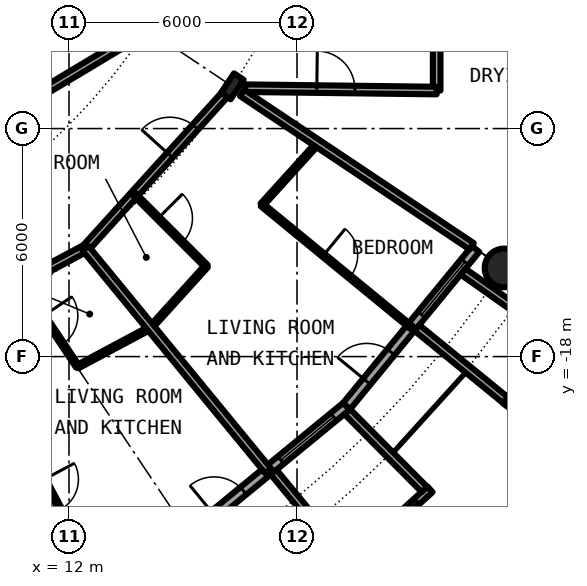
"""IFC4 building model, lengths in metres.
Left out: names, types, materials, properties, quantities, classifications, styles, units other than length and angle.
Written with IfcOpenShell. Run it as: python <this file> out.ifc"""

import sys

from ifc_helpers import new_model, si_unit, direction, frame, frame_2d, origin, origin_2d, place, context, subcontext, project, spatial, rectangle, circle, hollow_circle, i_section, extrude, element, fill, save


model = new_model("IFC4")
c1 = context("Model", 3, precision=1e-05, world=origin(), true_north=direction((0.0, 1.0)))
c2 = subcontext(c1, "Body", "Model", "MODEL_VIEW")
j1 = project(units=[si_unit("LENGTHUNIT", "METRE"), si_unit("PLANEANGLEUNIT", "RADIAN")], contexts=[c1])
p1 = place(None, origin())
s1 = spatial("IfcSite", under=j1, at=p1, CompositionType="ELEMENT")
p2 = place(p1, origin())
s2 = spatial("IfcBuilding", under=s1, at=p2, CompositionType="ELEMENT")
p3 = place(p2, frame((0.0, 0.0, 50.25)))
s3 = spatial("IfcBuildingStorey", under=s2, at=p3, CompositionType="ELEMENT", Elevation=50.25)
p4 = place(p3, frame((23.448, -15.667, 0.0), z_axis=(0.0, 0.0, 1.0), x_axis=(1.0, 0.0, 0.0)))
e1 = element("IfcColumn", 1, at=p4, inside=s3, PredefinedType="COLUMN", context=c2, shape_type="SweptSolid", body=[
    extrude(hollow_circle(Radius=0.508, WallThickness=0.05, at=origin_2d()), origin(), (0.0, 0.0, 1.0), 3.05),
])
p5 = place(p3, frame((16.297, -10.889, 0.0), z_axis=(0.0, 0.0, 1.0), x_axis=(0.831469612303, -0.55557023302, 0.0)))
e2 = element("IfcColumn", 2, at=p5, inside=s3, PredefinedType="COLUMN", context=c2, shape_type="SweptSolid", body=[
    extrude(i_section(OverallWidth=0.305, OverallDepth=0.62, WebThickness=0.021, FlangeThickness=0.04, FilletRadius=0.027, at=origin_2d()), origin(), (0.0, 0.0, 1.0), 3.05),
])
p6 = place(p3, frame((15.167, -22.699, 0.0), z_axis=(0.0, 0.0, 1.0), x_axis=(0.773019449054, 0.634382322723, 0.0)))
e3 = element("IfcWall", 3, at=p6, inside=s3, PredefinedType="SOLIDWALL", context=c2, shape_type="SweptSolid", body=[
    extrude(rectangle(XDim=5.352, YDim=0.25, at=frame_2d((2.676, 0.0))), origin(), (0.0, 0.0, 1.0), 2.7),
])
p7 = place(p6, frame((0.841, 0.0, 0.0)))
e4 = element("IfcOpeningElement", 4, at=p7, cuts=e3, PredefinedType="OPENING", context=c2, shape_type="SweptSolid", body=[
    extrude(rectangle(XDim=1.0, YDim=2.2, at=frame_2d((0.5, 1.1))), frame((0.0, 0.135, 0.0), z_axis=(0.0, -1.0, 0.0), x_axis=(1.0, 0.0, 0.0)), (0.0, 0.0, 1.0), 0.27),
])
p8 = place(p6, frame((3.111, 0.0, 0.3)))
e5 = element("IfcOpeningElement", 5, at=p8, cuts=e3, PredefinedType="OPENING", context=c2, shape_type="SweptSolid", body=[
    extrude(rectangle(XDim=1.8, YDim=2.1, at=frame_2d((0.9, 1.05))), frame((0.0, 0.135, 0.0), z_axis=(0.0, -1.0, 0.0), x_axis=(1.0, 0.0, 0.0)), (0.0, 0.0, 1.0), 0.27),
])
p9 = place(p3, frame((19.282, -23.503, -0.03), z_axis=(0.0, 0.0, 1.0), x_axis=(0.740998365753, 0.671506829416, 0.0)))
e6 = element("IfcWall", 6, at=p9, inside=s3, PredefinedType="SOLIDWALL", context=c2, shape_type="SweptSolid", body=[
    extrude(rectangle(XDim=2.993, YDim=0.2, at=frame_2d((1.497, 0.0))), origin(), (0.0, 0.0, 1.0), 2.73),
])
p10 = place(p9, frame((0.457, 0.0, 0.33)))
e7 = element("IfcOpeningElement", 7, at=p10, cuts=e6, PredefinedType="OPENING", context=c2, shape_type="SweptSolid", body=[
    extrude(circle(Radius=1.04, at=frame_2d((1.04, 1.04))), frame((0.0, 0.11, 0.0), z_axis=(0.0, -1.0, 0.0), x_axis=(1.0, 0.0, 0.0)), (0.0, 0.0, 1.0), 0.22),
])
p11 = place(p3, frame((17.384, -21.041, -0.03), z_axis=(0.0, 0.0, 1.0), x_axis=(0.63709551667, -0.770784861449, 0.0)))
e8 = element("IfcWall", 8, at=p11, inside=s3, PredefinedType="SOLIDWALL", context=c2, shape_type="SweptSolid", body=[
    extrude(rectangle(XDim=3.006, YDim=0.2, at=frame_2d((1.503, 0.0))), origin(), (0.0, 0.0, 1.0), 2.73),
])
p12 = place(p3, frame((19.323, -19.45, -0.03), z_axis=(0.0, 0.0, 1.0), x_axis=(0.704476739375, -0.709727076896, 0.0)))
e9 = element("IfcWall", 9, at=p12, inside=s3, PredefinedType="SOLIDWALL", context=c2, shape_type="SweptSolid", body=[
    extrude(rectangle(XDim=2.883, YDim=0.2, at=frame_2d((1.441, 0.0))), origin(), (0.0, 0.0, 1.0), 2.73),
])
p13 = place(p3, frame((19.304, -19.304, 0.0), z_axis=(0.0, 0.0, 1.0), x_axis=(0.634382322723, 0.773019449054, 0.0)))
e10 = element("IfcWall", 10, at=p13, inside=s3, PredefinedType="SOLIDWALL", context=c2, shape_type="SweptSolid", body=[
    extrude(rectangle(XDim=5.352, YDim=0.25, at=frame_2d((2.676, 0.0))), origin(), (0.0, 0.0, 1.0), 2.7),
])
p14 = place(p13, frame((0.841, 0.0, 0.0)))
e11 = element("IfcOpeningElement", 11, at=p14, cuts=e10, PredefinedType="OPENING", context=c2, shape_type="SweptSolid", body=[
    extrude(rectangle(XDim=1.0, YDim=2.2, at=frame_2d((0.5, 1.1))), frame((0.0, 0.135, 0.0), z_axis=(0.0, -1.0, 0.0), x_axis=(1.0, 0.0, 0.0)), (0.0, 0.0, 1.0), 0.27),
])
p15 = place(p13, frame((3.111, 0.0, 0.3)))
e12 = element("IfcOpeningElement", 12, at=p15, cuts=e10, PredefinedType="OPENING", context=c2, shape_type="SweptSolid", body=[
    extrude(rectangle(XDim=1.8, YDim=2.1, at=frame_2d((0.9, 1.05))), frame((0.0, 0.135, 0.0), z_axis=(0.0, -1.0, 0.0), x_axis=(1.0, 0.0, 0.0)), (0.0, 0.0, 1.0), 0.27),
])
p16 = place(p3, frame((23.497, -19.289, -0.03), z_axis=(0.0, 0.0, 1.0), x_axis=(0.60418752353, 0.796842165306, 0.0)))
e13 = element("IfcWall", 13, at=p16, inside=s3, PredefinedType="SOLIDWALL", context=c2, shape_type="SweptSolid", body=[
    extrude(rectangle(XDim=2.337, YDim=0.2, at=frame_2d((1.168, 0.0))), origin(), (0.0, 0.0, 1.0), 2.73),
])
p17 = place(p16, frame((0.128, 0.0, 0.33)))
e14 = element("IfcOpeningElement", 14, at=p17, cuts=e13, PredefinedType="OPENING", context=c2, shape_type="SweptSolid", body=[
    extrude(circle(Radius=1.04, at=frame_2d((1.04, 1.04))), frame((0.0, 0.11, 0.0), z_axis=(0.0, -1.0, 0.0), x_axis=(1.0, 0.0, 0.0)), (0.0, 0.0, 1.0), 0.22),
])
p18 = place(p3, frame((21.155, -17.246, -0.03), z_axis=(0.0, 0.0, 1.0), x_axis=(0.775179004516, -0.631741648902, 0.0)))
e15 = element("IfcWall", 15, at=p18, inside=s3, PredefinedType="SOLIDWALL", context=c2, shape_type="SweptSolid", body=[
    extrude(rectangle(XDim=3.006, YDim=0.2, at=frame_2d((1.503, 0.0))), origin(), (0.0, 0.0, 1.0), 2.73),
])
p19 = place(p3, frame((22.37, -15.765, -0.03), z_axis=(0.0, 0.0, 1.0), x_axis=(0.817256123454, -0.576274612209, 0.0)))
e16 = element("IfcWall", 16, at=p19, inside=s3, PredefinedType="SOLIDWALL", context=c2, shape_type="SweptSolid", body=[
    extrude(rectangle(XDim=2.933, YDim=0.2, at=frame_2d((1.466, 0.0))), origin(), (0.0, 0.0, 1.0), 2.73),
])
p20 = place(p3, frame((14.153, -17.234, 0.0), z_axis=(0.0, 0.0, 1.0), x_axis=(0.671144831591, 0.741326254107, 0.0)))
e17 = element("IfcWall", 17, at=p20, inside=s3, PredefinedType="PARTITIONING", context=c2, shape_type="SweptSolid", body=[
    extrude(rectangle(XDim=2.181, YDim=0.1, at=frame_2d((1.091, 0.0))), origin(), (0.0, 0.0, 1.0), 2.7),
])
p21 = place(p3, frame((17.077, -14.006, 0.0), z_axis=(0.0, 0.0, 1.0), x_axis=(0.671396556615, 0.741098282123, 0.0)))
e18 = element("IfcWall", 18, at=p21, inside=s3, PredefinedType="PARTITIONING", context=c2, shape_type="SweptSolid", body=[
    extrude(rectangle(XDim=2.182, YDim=0.1, at=frame_2d((1.091, 0.0))), origin(), (0.0, 0.0, 1.0), 2.7),
])
p22 = place(p3, frame((12.229, -18.264, 0.0), z_axis=(0.0, 0.0, 1.0), x_axis=(0.881786813167, 0.471648191055, 0.0)))
e19 = element("IfcWall", 19, at=p22, inside=s3, PredefinedType="PARTITIONING", context=c2, shape_type="SweptSolid", body=[
    extrude(rectangle(XDim=2.175, YDim=0.1, at=frame_2d((1.087, 0.0))), origin(), (0.0, 0.0, 1.0), 2.7),
])
p23 = place(p3, frame((21.675, -11.0, 0.0), z_axis=(0.0, 0.0, 1.0), x_axis=(0.0, 1.0, 0.0)))
e20 = element("IfcWall", 20, at=p23, inside=s3, PredefinedType="PARTITIONING", context=c2, shape_type="SweptSolid", body=[
    extrude(rectangle(XDim=1.6, YDim=0.2, at=frame_2d((0.8, 0.0))), origin(), (0.0, 0.0, 1.0), 2.7),
])
p24 = place(p3, frame((12.434, -15.151, 0.0), z_axis=(0.0, 0.0, 1.0), x_axis=(0.671514934772, 0.740991020444, 0.0)))
e21 = element("IfcWall", 21, at=p24, inside=s3, PredefinedType="PARTITIONING", context=c2, shape_type="SweptSolid", body=[
    extrude(rectangle(XDim=5.598, YDim=0.2, at=frame_2d((2.799, 0.0))), origin(), (0.0, 0.0, 1.0), 2.38),
])
p25 = place(p24, frame((3.305, 0.0, 0.0)))
e22 = element("IfcOpeningElement", 22, at=p25, cuts=e21, PredefinedType="OPENING", context=c2, shape_type="SweptSolid", body=[
    extrude(rectangle(XDim=1.0, YDim=2.3, at=frame_2d((0.5, 1.15))), frame((0.0, 0.11, 0.0), z_axis=(0.0, -1.0, 0.0), x_axis=(1.0, 0.0, 0.0)), (0.0, 0.0, 1.0), 0.22),
])
p26 = place(p3, frame((10.867, -15.989, 0.0), z_axis=(0.0, 0.0, 1.0), x_axis=(0.881596178172, 0.472004426496, 0.0)))
e23 = element("IfcWall", 23, at=p26, inside=s3, PredefinedType="PARTITIONING", context=c2, shape_type="SweptSolid", body=[
    extrude(rectangle(XDim=1.78, YDim=0.2, at=frame_2d((0.89, 0.0))), origin(), (0.0, 0.0, 1.0), 2.38),
])
p27 = place(p3, frame((1.656, -16.819, 0.0), z_axis=(0.0, 0.0, 1.0), x_axis=(0.857773470126, 0.514027892189, 0.0)))
e24 = element("IfcWall", 24, at=p27, inside=s3, PredefinedType="PARTITIONING", context=c2, shape_type="SweptSolid", body=[
    extrude(rectangle(XDim=14.429, YDim=0.2, at=frame_2d((7.215, 0.0))), origin(), (0.0, 0.0, 1.0), 2.7),
])
p28 = place(p27, frame((4.318, 0.0, 0.0)))
e25 = element("IfcOpeningElement", 25, at=p28, cuts=e24, PredefinedType="OPENING", context=c2, shape_type="SweptSolid", body=[
    extrude(rectangle(XDim=1.0, YDim=2.3, at=frame_2d((0.5, 1.15))), frame((0.0, 0.11, 0.0), z_axis=(0.0, -1.0, 0.0), x_axis=(1.0, 0.0, 0.0)), (0.0, 0.0, 1.0), 0.22),
])
p29 = place(p3, frame((16.637, -10.938, 0.0), z_axis=(0.0, 0.0, 1.0), x_axis=(0.99992425795, -0.012307654658, 0.0)))
e26 = element("IfcWall", 26, at=p29, inside=s3, PredefinedType="PARTITIONING", context=c2, shape_type="SweptSolid", body=[
    extrude(rectangle(XDim=5.039, YDim=0.2, at=frame_2d((2.519, 0.0))), origin(), (0.0, 0.0, 1.0), 2.7),
])
p30 = place(p29, frame((1.884, 0.0, 0.0)))
e27 = element("IfcOpeningElement", 27, at=p30, cuts=e26, PredefinedType="OPENING", context=c2, shape_type="SweptSolid", body=[
    extrude(rectangle(XDim=1.0, YDim=2.3, at=frame_2d((0.5, 1.15))), frame((0.0, 0.11, 0.0), z_axis=(0.0, -1.0, 0.0), x_axis=(1.0, 0.0, 0.0)), (0.0, 0.0, 1.0), 0.22),
])
p31 = place(p3, frame((10.31, -19.289, 0.0), z_axis=(0.0, 0.0, 1.0), x_axis=(0.47140999111, -0.881914179658, 0.0)))
e28 = element("IfcWall", 28, at=p31, inside=s3, PredefinedType="PARTITIONING", context=c2, shape_type="SweptSolid", body=[
    extrude(rectangle(XDim=5.303, YDim=0.1, at=frame_2d((2.652, 0.0))), origin(), (0.0, 0.0, 1.0), 2.7),
])
p32 = place(p31, frame((2.202, 0.0, 0.0)))
e29 = element("IfcOpeningElement", 29, at=p32, cuts=e28, PredefinedType="OPENING", context=c2, shape_type="SweptSolid", body=[
    extrude(rectangle(XDim=0.9, YDim=2.3, at=frame_2d((0.45, 1.15))), frame((0.0, 0.06, 0.0), z_axis=(0.0, -1.0, 0.0), x_axis=(1.0, 0.0, 0.0)), (0.0, 0.0, 1.0), 0.12),
])
p33 = place(p3, frame((11.077, -16.544, 0.0), z_axis=(0.0, 0.0, 1.0), x_axis=(0.556522278225, -0.830832687031, 0.0)))
e30 = element("IfcWall", 30, at=p33, inside=s3, PredefinedType="PARTITIONING", context=c2, shape_type="SweptSolid", body=[
    extrude(rectangle(XDim=2.07, YDim=0.1, at=frame_2d((1.035, 0.0))), origin(), (0.0, 0.0, 1.0), 2.7),
])
p34 = place(p33, frame((0.458, 0.0, 0.0)))
e31 = element("IfcOpeningElement", 31, at=p34, cuts=e30, PredefinedType="OPENING", context=c2, shape_type="SweptSolid", body=[
    extrude(rectangle(XDim=0.9, YDim=2.3, at=frame_2d((0.45, 1.15))), frame((0.0, 0.06, 0.0), z_axis=(0.0, -1.0, 0.0), x_axis=(1.0, 0.0, 0.0)), (0.0, 0.0, 1.0), 0.12),
])
p35 = place(p3, frame((12.434, -15.151, 0.0), z_axis=(0.0, 0.0, 1.0), x_axis=(0.634381303318, -0.773020285633, 0.0)))
e32 = element("IfcWall", 32, at=p35, inside=s3, PredefinedType="PARTITIONING", context=c2, shape_type="SweptSolid", body=[
    extrude(rectangle(XDim=7.576, YDim=0.2, at=frame_2d((3.788, 0.0))), origin(), (0.0, 0.0, 1.0), 2.7),
])
p36 = place(p3, frame((13.722, -13.73, 0.0), z_axis=(0.0, 0.0, 1.0), x_axis=(0.706741540154, -0.707471833659, 0.0)))
e33 = element("IfcWall", 33, at=p36, inside=s3, PredefinedType="PARTITIONING", context=c2, shape_type="SweptSolid", body=[
    extrude(rectangle(XDim=2.674, YDim=0.1, at=frame_2d((1.337, 0.0))), origin(), (0.0, 0.0, 1.0), 2.7),
])
p37 = place(p36, frame((0.887, 0.0, 0.0)))
e34 = element("IfcOpeningElement", 34, at=p37, cuts=e33, PredefinedType="OPENING", context=c2, shape_type="SweptSolid", body=[
    extrude(rectangle(XDim=0.9, YDim=2.3, at=frame_2d((0.45, 1.15))), frame((0.0, 0.06, 0.0), z_axis=(0.0, -1.0, 0.0), x_axis=(1.0, 0.0, 0.0)), (0.0, 0.0, 1.0), 0.12),
])
p38 = place(p3, frame((16.555, -11.061, 0.0), z_axis=(0.0, 0.0, 1.0), x_axis=(0.831465568067, -0.555576285599, 0.0)))
e35 = element("IfcWall", 35, at=p38, inside=s3, PredefinedType="PARTITIONING", context=c2, shape_type="SweptSolid", body=[
    extrude(rectangle(XDim=7.264, YDim=0.2, at=frame_2d((3.632, 0.0))), origin(), (0.0, 0.0, 1.0), 2.7),
])
p39 = place(p3, frame((17.077, -14.006, 0.0), z_axis=(0.0, 0.0, 1.0), x_axis=(0.77326214499, -0.634086472908, 0.0)))
e36 = element("IfcWall", 36, at=p39, inside=s3, PredefinedType="PARTITIONING", context=c2, shape_type="SweptSolid", body=[
    extrude(rectangle(XDim=5.089, YDim=0.1, at=frame_2d((2.544, 0.0))), origin(), (0.0, 0.0, 1.0), 2.7),
])
p40 = place(p39, frame((2.094, 0.0, 0.0)))
e37 = element("IfcOpeningElement", 37, at=p40, cuts=e36, PredefinedType="OPENING", context=c2, shape_type="SweptSolid", body=[
    extrude(rectangle(XDim=0.9, YDim=2.3, at=frame_2d((0.45, 1.15))), frame((0.0, 0.06, 0.0), z_axis=(0.0, -1.0, 0.0), x_axis=(1.0, 0.0, 0.0)), (0.0, 0.0, 1.0), 0.12),
])
p41 = place(p7, origin())
e38 = element("IfcDoor", 38, at=p41, inside=s3, OperationType="SINGLE_SWING_LEFT", PredefinedType="DOOR", context=c2, shape_type="SweptSolid", body=[
    extrude(rectangle(XDim=1.0, YDim=2.2, at=frame_2d((0.5, 1.1))), frame((0.0, 0.025, 0.0), z_axis=(0.0, -1.0, 0.0), x_axis=(1.0, 0.0, 0.0)), (0.0, 0.0, 1.0), 0.05),
])
fill(e4, e38)
p42 = place(p8, origin())
e39 = element("IfcWindow", 39, at=p42, inside=s3, PartitioningType="SINGLE_PANEL", PredefinedType="WINDOW", context=c2, shape_type="SweptSolid", body=[
    extrude(rectangle(XDim=1.8, YDim=2.1, at=frame_2d((0.9, 1.05))), frame((0.0, 0.03, 0.0), z_axis=(0.0, -1.0, 0.0), x_axis=(1.0, 0.0, 0.0)), (0.0, 0.0, 1.0), 0.06),
])
fill(e5, e39)
p43 = place(p10, origin())
e40 = element("IfcWindow", 40, at=p43, inside=s3, PartitioningType="SINGLE_PANEL", PredefinedType="WINDOW", context=c2, shape_type="SweptSolid", body=[
    extrude(circle(Radius=1.04, at=frame_2d((1.04, 1.04))), frame((0.0, 0.03, 0.0), z_axis=(0.0, -1.0, 0.0), x_axis=(1.0, 0.0, 0.0)), (0.0, 0.0, 1.0), 0.06),
])
fill(e7, e40)
p44 = place(p14, origin())
e41 = element("IfcDoor", 41, at=p44, inside=s3, OperationType="SINGLE_SWING_LEFT", PredefinedType="DOOR", context=c2, shape_type="SweptSolid", body=[
    extrude(rectangle(XDim=1.0, YDim=2.2, at=frame_2d((0.5, 1.1))), frame((0.0, 0.025, 0.0), z_axis=(0.0, -1.0, 0.0), x_axis=(1.0, 0.0, 0.0)), (0.0, 0.0, 1.0), 0.05),
])
fill(e11, e41)
p45 = place(p15, origin())
e42 = element("IfcWindow", 42, at=p45, inside=s3, PartitioningType="SINGLE_PANEL", PredefinedType="WINDOW", context=c2, shape_type="SweptSolid", body=[
    extrude(rectangle(XDim=1.8, YDim=2.1, at=frame_2d((0.9, 1.05))), frame((0.0, 0.03, 0.0), z_axis=(0.0, -1.0, 0.0), x_axis=(1.0, 0.0, 0.0)), (0.0, 0.0, 1.0), 0.06),
])
fill(e12, e42)
p46 = place(p34, origin())
e43 = element("IfcDoor", 43, at=p46, inside=s3, OperationType="SINGLE_SWING_LEFT", PredefinedType="DOOR", context=c2, shape_type="SweptSolid", body=[
    extrude(rectangle(XDim=0.9, YDim=2.3, at=frame_2d((0.45, 1.15))), frame((0.0, 0.025, 0.0), z_axis=(0.0, -1.0, 0.0), x_axis=(1.0, 0.0, 0.0)), (0.0, 0.0, 1.0), 0.05),
])
fill(e31, e43)
p47 = place(p32, origin())
e44 = element("IfcDoor", 44, at=p47, inside=s3, OperationType="SINGLE_SWING_RIGHT", PredefinedType="DOOR", context=c2, shape_type="SweptSolid", body=[
    extrude(rectangle(XDim=0.9, YDim=2.3, at=frame_2d((0.45, 1.15))), frame((0.0, 0.025, 0.0), z_axis=(0.0, -1.0, 0.0), x_axis=(1.0, 0.0, 0.0)), (0.0, 0.0, 1.0), 0.05),
])
fill(e29, e44)
p48 = place(p25, origin())
e45 = element("IfcDoor", 45, at=p48, inside=s3, OperationType="SINGLE_SWING_RIGHT", PredefinedType="DOOR", context=c2, shape_type="SweptSolid", body=[
    extrude(rectangle(XDim=1.0, YDim=2.3, at=frame_2d((0.5, 1.15))), frame((0.0, 0.025, 0.0), z_axis=(0.0, -1.0, 0.0), x_axis=(1.0, 0.0, 0.0)), (0.0, 0.0, 1.0), 0.05),
])
fill(e22, e45)
p49 = place(p37, origin())
e46 = element("IfcDoor", 46, at=p49, inside=s3, OperationType="SINGLE_SWING_RIGHT", PredefinedType="DOOR", context=c2, shape_type="SweptSolid", body=[
    extrude(rectangle(XDim=0.9, YDim=2.3, at=frame_2d((0.45, 1.15))), frame((0.0, 0.025, 0.0), z_axis=(0.0, -1.0, 0.0), x_axis=(1.0, 0.0, 0.0)), (0.0, 0.0, 1.0), 0.05),
])
fill(e34, e46)
p50 = place(p40, origin())
e47 = element("IfcDoor", 47, at=p50, inside=s3, OperationType="SINGLE_SWING_LEFT", PredefinedType="DOOR", context=c2, shape_type="SweptSolid", body=[
    extrude(rectangle(XDim=0.9, YDim=2.3, at=frame_2d((0.45, 1.15))), frame((0.0, 0.025, 0.0), z_axis=(0.0, -1.0, 0.0), x_axis=(1.0, 0.0, 0.0)), (0.0, 0.0, 1.0), 0.05),
])
fill(e37, e47)
p51 = place(p30, origin())
e48 = element("IfcDoor", 48, at=p51, inside=s3, OperationType="SINGLE_SWING_LEFT", PredefinedType="DOOR", context=c2, shape_type="SweptSolid", body=[
    extrude(rectangle(XDim=1.0, YDim=2.3, at=frame_2d((0.5, 1.15))), frame((0.0, 0.025, 0.0), z_axis=(0.0, -1.0, 0.0), x_axis=(1.0, 0.0, 0.0)), (0.0, 0.0, 1.0), 0.05),
])
fill(e27, e48)
save(model, sys.argv[1])
